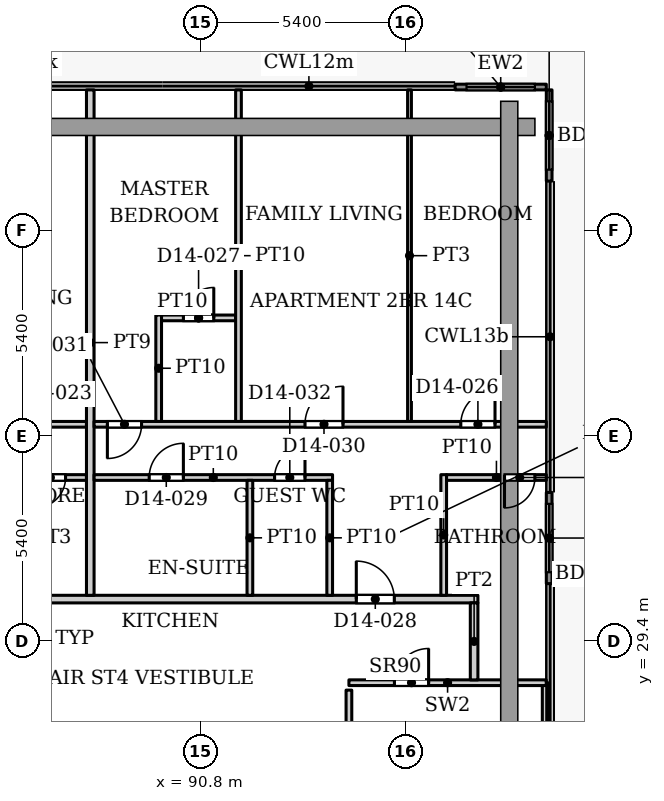
"""IFC4 building model, lengths in metres.
Left out: names, types, materials, properties, quantities, classifications, styles, units other than length and angle.
Written with IfcOpenShell. Run it as: python <this file> out.ifc"""

import sys

from ifc_helpers import new_model, si_unit, direction, frame, frame_2d, origin, place, context, subcontext, project, spatial, rectangle, extrude, source, transform, mapped, element, fill, save


model = new_model("IFC4")
c1 = context("Model", 3, precision=1e-05, world=origin(), true_north=direction((0.0, 1.0)))
c2 = subcontext(c1, "Body", "Model", "MODEL_VIEW")
j1 = project(units=[si_unit("LENGTHUNIT", "METRE"), si_unit("PLANEANGLEUNIT", "RADIAN")], contexts=[c1])
p1 = place(None, origin())
s1 = spatial("IfcSite", under=j1, at=p1, CompositionType="ELEMENT")
p2 = place(p1, origin())
s2 = spatial("IfcBuilding", under=s1, at=p2, CompositionType="ELEMENT")
p3 = place(p2, frame((0.0, 0.0, 61.7)))
s3 = spatial("IfcBuildingStorey", under=s2, at=p3, CompositionType="ELEMENT", Elevation=61.7)
p4 = place(p3, frame((97.5, 43.975, 0.0), z_axis=(0.0, 0.0, 1.0), x_axis=(1.0, 0.0, 0.0)))
e1 = element("IfcWall", 1, at=p4, inside=s3, PredefinedType="SOLIDWALL", context=c2, shape_type="SweptSolid", body=[
    extrude(rectangle(XDim=2.4, YDim=0.15, at=frame_2d((1.2, 0.0))), origin(), (0.0, 0.0, 1.0), 3.75),
])
p5 = place(p4, frame((0.3, 0.0, 0.0)))
e2 = element("IfcOpeningElement", 2, at=p5, cuts=e1, PredefinedType="OPENING", context=c2, shape_type="SweptSolid", body=[
    extrude(rectangle(XDim=1.8, YDim=2.4, at=frame_2d((0.9, 1.2))), frame((0.0, 0.085, 0.0), z_axis=(0.0, -1.0, 0.0), x_axis=(1.0, 0.0, 0.0)), (0.0, 0.0, 1.0), 0.17),
])
p6 = place(p3, frame((99.975, 43.9, 0.0), z_axis=(0.0, 0.0, 1.0), x_axis=(0.0, -1.0, 0.0)))
e3 = element("IfcWall", 3, at=p6, inside=s3, PredefinedType="SOLIDWALL", context=c2, shape_type="SweptSolid", body=[
    extrude(rectangle(XDim=2.4, YDim=0.15, at=frame_2d((1.2, 0.0))), origin(), (0.0, 0.0, 1.0), 3.75),
])
p7 = place(p6, frame((0.3, 0.0, 0.0)))
e4 = element("IfcOpeningElement", 4, at=p7, cuts=e3, PredefinedType="OPENING", context=c2, shape_type="SweptSolid", body=[
    extrude(rectangle(XDim=1.8, YDim=2.4, at=frame_2d((0.9, 1.2))), frame((0.0, 0.085, 0.0), z_axis=(0.0, -1.0, 0.0), x_axis=(1.0, 0.0, 0.0)), (0.0, 0.0, 1.0), 0.17),
])
p8 = place(p3, frame((99.975, 33.307, 0.0), z_axis=(0.0, 0.0, 1.0), x_axis=(0.0, -1.0, 0.0)))
e5 = element("IfcWall", 5, at=p8, inside=s3, PredefinedType="SOLIDWALL", context=c2, shape_type="SweptSolid", body=[
    extrude(rectangle(XDim=2.4, YDim=0.15, at=frame_2d((1.2, 0.0))), origin(), (0.0, 0.0, 1.0), 3.75),
])
p9 = place(p8, frame((0.3, 0.0, 0.0)))
e6 = element("IfcOpeningElement", 6, at=p9, cuts=e5, PredefinedType="OPENING", context=c2, shape_type="SweptSolid", body=[
    extrude(rectangle(XDim=1.8, YDim=2.4, at=frame_2d((0.9, 1.2))), frame((0.0, 0.085, 0.0), z_axis=(0.0, -1.0, 0.0), x_axis=(1.0, 0.0, 0.0)), (0.0, 0.0, 1.0), 0.17),
])
p10 = place(p3, frame((99.87, 21.015, 0.0), z_axis=(0.0, 0.0, 1.0), x_axis=(0.0, 1.0, 0.0)))
e7 = element("IfcWall", 7, at=p10, inside=s3, PredefinedType="PARTITIONING", context=c2, shape_type="SweptSolid", body=[
    extrude(rectangle(XDim=7.285, YDim=0.15, at=frame_2d((3.643, 0.0))), origin(), (0.0, 0.0, 1.0), 3.9),
])
p11 = place(p3, frame((94.706, 28.3, 0.0), z_axis=(0.0, 0.0, 1.0), x_axis=(1.0, 0.0, 0.0)))
e8 = element("IfcWall", 8, at=p11, inside=s3, PredefinedType="PARTITIONING", context=c2, shape_type="SweptSolid", body=[
    extrude(rectangle(XDim=5.192, YDim=0.15, at=frame_2d((2.596, 0.0))), origin(), (0.0, 0.0, 1.0), 3.9),
])
p12 = place(p11, frame((1.197, 0.0, 0.0)))
e9 = element("IfcOpeningElement", 9, at=p12, cuts=e8, PredefinedType="OPENING", context=c2, shape_type="SweptSolid", body=[
    extrude(rectangle(XDim=0.9, YDim=2.2, at=frame_2d((0.45, 1.1))), frame((0.0, 0.085, 0.0), z_axis=(0.0, -1.0, 0.0), x_axis=(1.0, 0.0, 0.0)), (0.0, 0.0, 1.0), 0.17),
])
p13 = place(p3, frame((94.706, 21.287, 0.0), z_axis=(0.0, 0.0, 1.0), x_axis=(0.0, 1.0, 0.0)))
e10 = element("IfcWall", 10, at=p13, inside=s3, PredefinedType="PARTITIONING", context=c2, shape_type="SweptSolid", body=[
    extrude(rectangle(XDim=6.818, YDim=0.15, at=frame_2d((3.409, 0.0))), origin(), (0.0, 0.0, 1.0), 3.9),
])
p14 = place(p3, frame((55.9, 30.5, 0.0), z_axis=(0.0, 0.0, 1.0), x_axis=(1.0, 0.0, 0.0)))
e11 = element("IfcWall", 11, at=p14, inside=s3, PredefinedType="PARTITIONING", context=c2, shape_type="SweptSolid", body=[
    extrude(rectangle(XDim=42.2, YDim=0.2, at=frame_2d((21.1, 0.0))), origin(), (0.0, 0.0, 1.0), 3.6),
])
p15 = place(p14, frame((14.7, 0.0, 0.0)))
e12 = element("IfcOpeningElement", 12, at=p15, cuts=e11, PredefinedType="OPENING", context=c2, shape_type="SweptSolid", body=[
    extrude(rectangle(XDim=1.0, YDim=2.1, at=frame_2d((0.5, 1.05))), frame((0.0, 0.11, 0.0), z_axis=(0.0, -1.0, 0.0), x_axis=(1.0, 0.0, 0.0)), (0.0, 0.0, 1.0), 0.22),
])
p16 = place(p14, frame((27.9, 0.0, 0.0)))
e13 = element("IfcOpeningElement", 13, at=p16, cuts=e11, PredefinedType="OPENING", context=c2, shape_type="SweptSolid", body=[
    extrude(rectangle(XDim=1.0, YDim=2.1, at=frame_2d((0.5, 1.05))), frame((0.0, 0.11, 0.0), z_axis=(0.0, -1.0, 0.0), x_axis=(1.0, 0.0, 0.0)), (0.0, 0.0, 1.0), 0.22),
])
p17 = place(p14, frame((39.0, 0.0, 0.0)))
e14 = element("IfcOpeningElement", 14, at=p17, cuts=e11, PredefinedType="OPENING", context=c2, shape_type="SweptSolid", body=[
    extrude(rectangle(XDim=1.0, YDim=2.1, at=frame_2d((0.5, 1.05))), frame((0.0, 0.11, 0.0), z_axis=(0.0, -1.0, 0.0), x_axis=(1.0, 0.0, 0.0)), (0.0, 0.0, 1.0), 0.22),
])
p18 = place(p3, frame((74.5, 35.1, 0.0), z_axis=(0.0, 0.0, 1.0), x_axis=(1.0, 0.0, 0.0)))
e15 = element("IfcWall", 15, at=p18, inside=s3, PredefinedType="PARTITIONING", context=c2, shape_type="SweptSolid", body=[
    extrude(rectangle(XDim=13.3, YDim=0.15, at=frame_2d((6.65, 0.0))), origin(), (0.0, 0.0, 1.0), 3.6),
])
p19 = place(p18, frame((1.1, 0.0, 0.0)))
e16 = element("IfcOpeningElement", 16, at=p19, cuts=e15, PredefinedType="OPENING", context=c2, shape_type="SweptSolid", body=[
    extrude(rectangle(XDim=0.9, YDim=2.1, at=frame_2d((0.45, 1.05))), frame((0.0, 0.085, 0.0), z_axis=(0.0, -1.0, 0.0), x_axis=(1.0, 0.0, 0.0)), (0.0, 0.0, 1.0), 0.17),
])
p20 = place(p18, frame((9.95, 0.0, 0.0)))
e17 = element("IfcOpeningElement", 17, at=p20, cuts=e15, PredefinedType="OPENING", context=c2, shape_type="SweptSolid", body=[
    extrude(rectangle(XDim=1.0, YDim=2.1, at=frame_2d((0.5, 1.05))), frame((0.0, 0.085, 0.0), z_axis=(0.0, -1.0, 0.0), x_axis=(1.0, 0.0, 0.0)), (0.0, 0.0, 1.0), 0.17),
])
p21 = place(p18, frame((4.25, 0.0, 0.0)))
e18 = element("IfcOpeningElement", 18, at=p21, cuts=e15, PredefinedType="OPENING", context=c2, shape_type="SweptSolid", body=[
    extrude(rectangle(XDim=0.9, YDim=2.1, at=frame_2d((0.45, 1.05))), frame((0.0, 0.085, 0.0), z_axis=(0.0, -1.0, 0.0), x_axis=(1.0, 0.0, 0.0)), (0.0, 0.0, 1.0), 0.17),
])
p22 = place(p3, frame((85.75, 33.7, 0.0), z_axis=(0.0, 0.0, 1.0), x_axis=(1.0, 0.0, 0.0)))
e19 = element("IfcWall", 19, at=p22, inside=s3, PredefinedType="PARTITIONING", context=c2, shape_type="SweptSolid", body=[
    extrude(rectangle(XDim=2.05, YDim=0.15, at=frame_2d((1.025, 0.0))), origin(), (0.0, 0.0, 1.0), 3.6),
])
p23 = place(p22, frame((0.7, 0.0, 0.0)))
e20 = element("IfcOpeningElement", 20, at=p23, cuts=e19, PredefinedType="OPENING", context=c2, shape_type="SweptSolid", body=[
    extrude(rectangle(XDim=0.8, YDim=2.1, at=frame_2d((0.4, 1.05))), frame((0.0, 0.085, 0.0), z_axis=(0.0, -1.0, 0.0), x_axis=(1.0, 0.0, 0.0)), (0.0, 0.0, 1.0), 0.17),
])
p24 = place(p3, frame((87.9, 30.6, 0.0), z_axis=(0.0, 0.0, 1.0), x_axis=(0.0, 1.0, 0.0)))
e21 = element("IfcWall", 21, at=p24, inside=s3, PredefinedType="PARTITIONING", context=c2, shape_type="SweptSolid", body=[
    extrude(rectangle(XDim=13.3, YDim=0.2, at=frame_2d((6.65, 0.0))), origin(), (0.0, 0.0, 1.0), 3.6),
])
p25 = place(p3, frame((88.0, 33.7, 0.0), z_axis=(0.0, 0.0, 1.0), x_axis=(1.0, 0.0, 0.0)))
e22 = element("IfcWall", 22, at=p25, inside=s3, PredefinedType="PARTITIONING", context=c2, shape_type="SweptSolid", body=[
    extrude(rectangle(XDim=6.275, YDim=0.15, at=frame_2d((3.137, 0.0))), origin(), (0.0, 0.0, 1.0), 3.6),
])
p26 = place(p25, frame((1.45, 0.0, 0.0)))
e23 = element("IfcOpeningElement", 23, at=p26, cuts=e22, PredefinedType="OPENING", context=c2, shape_type="SweptSolid", body=[
    extrude(rectangle(XDim=0.9, YDim=2.1, at=frame_2d((0.45, 1.05))), frame((0.0, 0.085, 0.0), z_axis=(0.0, -1.0, 0.0), x_axis=(1.0, 0.0, 0.0)), (0.0, 0.0, 1.0), 0.17),
])
p27 = place(p25, frame((4.75, 0.0, 0.0)))
e24 = element("IfcOpeningElement", 24, at=p27, cuts=e22, PredefinedType="OPENING", context=c2, shape_type="SweptSolid", body=[
    extrude(rectangle(XDim=0.8, YDim=2.1, at=frame_2d((0.4, 1.05))), frame((0.0, 0.085, 0.0), z_axis=(0.0, -1.0, 0.0), x_axis=(1.0, 0.0, 0.0)), (0.0, 0.0, 1.0), 0.17),
])
p28 = place(p3, frame((88.0, 35.1, 0.0), z_axis=(0.0, 0.0, 1.0), x_axis=(1.0, 0.0, 0.0)))
e25 = element("IfcWall", 25, at=p28, inside=s3, PredefinedType="PARTITIONING", context=c2, shape_type="SweptSolid", body=[
    extrude(rectangle(XDim=11.9, YDim=0.15, at=frame_2d((5.95, 0.0))), origin(), (0.0, 0.0, 1.0), 3.6),
])
p29 = place(p28, frame((9.65, 0.0, 0.0)))
e26 = element("IfcOpeningElement", 26, at=p29, cuts=e25, PredefinedType="OPENING", context=c2, shape_type="SweptSolid", body=[
    extrude(rectangle(XDim=0.9, YDim=2.1, at=frame_2d((0.45, 1.05))), frame((0.0, 0.085, 0.0), z_axis=(0.0, -1.0, 0.0), x_axis=(1.0, 0.0, 0.0)), (0.0, 0.0, 1.0), 0.17),
])
p30 = place(p28, frame((5.55, 0.0, 0.0)))
e27 = element("IfcOpeningElement", 27, at=p30, cuts=e25, PredefinedType="OPENING", context=c2, shape_type="SweptSolid", body=[
    extrude(rectangle(XDim=1.0, YDim=2.1, at=frame_2d((0.5, 1.05))), frame((0.0, 0.085, 0.0), z_axis=(0.0, -1.0, 0.0), x_axis=(1.0, 0.0, 0.0)), (0.0, 0.0, 1.0), 0.17),
])
p31 = place(p28, frame((0.35, 0.0, 0.0)))
e28 = element("IfcOpeningElement", 28, at=p31, cuts=e25, PredefinedType="OPENING", context=c2, shape_type="SweptSolid", body=[
    extrude(rectangle(XDim=0.9, YDim=2.1, at=frame_2d((0.45, 1.05))), frame((0.0, 0.085, 0.0), z_axis=(0.0, -1.0, 0.0), x_axis=(1.0, 0.0, 0.0)), (0.0, 0.0, 1.0), 0.17),
])
p32 = place(p3, frame((89.7, 35.175, 0.0), z_axis=(0.0, 0.0, 1.0), x_axis=(0.0, 1.0, 0.0)))
e29 = element("IfcWall", 29, at=p32, inside=s3, PredefinedType="PARTITIONING", context=c2, shape_type="SweptSolid", body=[
    extrude(rectangle(XDim=2.8, YDim=0.15, at=frame_2d((1.4, 0.0))), origin(), (0.0, 0.0, 1.0), 3.6),
])
p33 = place(p3, frame((89.775, 37.9, 0.0), z_axis=(0.0, 0.0, 1.0), x_axis=(1.0, 0.0, 0.0)))
e30 = element("IfcWall", 30, at=p33, inside=s3, PredefinedType="PARTITIONING", context=c2, shape_type="SweptSolid", body=[
    extrude(rectangle(XDim=1.95, YDim=0.15, at=frame_2d((0.975, 0.0))), origin(), (0.0, 0.0, 1.0), 3.6),
])
p34 = place(p33, frame((0.575, 0.0, 0.0)))
e31 = element("IfcOpeningElement", 31, at=p34, cuts=e30, PredefinedType="OPENING", context=c2, shape_type="SweptSolid", body=[
    extrude(rectangle(XDim=0.8, YDim=2.1, at=frame_2d((0.4, 1.05))), frame((0.0, 0.085, 0.0), z_axis=(0.0, -1.0, 0.0), x_axis=(1.0, 0.0, 0.0)), (0.0, 0.0, 1.0), 0.17),
])
p35 = place(p3, frame((91.8, 35.175, 0.0), z_axis=(0.0, 0.0, 1.0), x_axis=(0.0, 1.0, 0.0)))
e32 = element("IfcWall", 32, at=p35, inside=s3, PredefinedType="PARTITIONING", context=c2, shape_type="SweptSolid", body=[
    extrude(rectangle(XDim=8.725, YDim=0.15, at=frame_2d((4.362, 0.0))), origin(), (0.0, 0.0, 1.0), 3.6),
])
for number, where, z_axis, x_axis in (
    (33, (92.1, 30.6, 0.0), (0.0, 0.0, 1.0), (0.0, 1.0, 0.0)),
    (34, (94.2, 30.6, 0.0), (0.0, 0.0, 1.0), (0.0, 1.0, 0.0)),
):
    element("IfcWall", number, at=place(p3, frame(where, z_axis=z_axis, x_axis=x_axis)), inside=s3, PredefinedType="PARTITIONING", context=c2, shape_type="SweptSolid", body=[
        extrude(rectangle(XDim=3.025, YDim=0.15, at=frame_2d((1.512, 0.0))), origin(), (0.0, 0.0, 1.0), 3.6),
    ])
p36 = place(p3, frame((96.3, 35.175, 0.0), z_axis=(0.0, 0.0, 1.0), x_axis=(0.0, 1.0, 0.0)))
e35 = element("IfcWall", 35, at=p36, inside=s3, PredefinedType="PARTITIONING", context=c2, shape_type="SweptSolid", body=[
    extrude(rectangle(XDim=8.725, YDim=0.1, at=frame_2d((4.362, 0.0))), origin(), (0.0, 0.0, 1.0), 3.6),
])
p37 = place(p3, frame((97.2, 30.6, 0.0), z_axis=(0.0, 0.0, 1.0), x_axis=(0.0, 1.0, 0.0)))
e36 = element("IfcWall", 36, at=p37, inside=s3, PredefinedType="PARTITIONING", context=c2, shape_type="SweptSolid", body=[
    extrude(rectangle(XDim=3.175, YDim=0.15, at=frame_2d((1.587, 0.0))), origin(), (0.0, 0.0, 1.0), 3.6),
])
p38 = place(p3, frame((97.275, 33.7, 0.0), z_axis=(0.0, 0.0, 1.0), x_axis=(1.0, 0.0, 0.0)))
e37 = element("IfcWall", 37, at=p38, inside=s3, PredefinedType="PARTITIONING", context=c2, shape_type="SweptSolid", body=[
    extrude(rectangle(XDim=2.625, YDim=0.15, at=frame_2d((1.312, 0.0))), origin(), (0.0, 0.0, 1.0), 3.6),
])
p39 = place(p38, frame((1.525, 0.0, 0.0)))
e38 = element("IfcOpeningElement", 38, at=p39, cuts=e37, PredefinedType="OPENING", context=c2, shape_type="SweptSolid", body=[
    extrude(rectangle(XDim=0.8, YDim=2.1, at=frame_2d((0.4, 1.05))), frame((0.0, 0.085, 0.0), z_axis=(0.0, -1.0, 0.0), x_axis=(1.0, 0.0, 0.0)), (0.0, 0.0, 1.0), 0.17),
])
p40 = place(p3, frame((98.0, 28.374, 0.0), z_axis=(0.0, 0.0, 1.0), x_axis=(0.0, 1.0, 0.0)))
e39 = element("IfcWall", 39, at=p40, inside=s3, PredefinedType="PARTITIONING", context=c2, shape_type="SweptSolid", body=[
    extrude(rectangle(XDim=2.026, YDim=0.2, at=frame_2d((1.013, 0.0))), origin(), (0.0, 0.0, 1.0), 3.6),
])
m1 = source(origin(), c2, "Body", "SweptSolid", [
    extrude(rectangle(XDim=1.8, YDim=2.4, at=frame_2d((0.9, 1.2))), frame((0.0, 0.025, 0.0), z_axis=(0.0, -1.0, 0.0), x_axis=(1.0, 0.0, 0.0)), (0.0, 0.0, 1.0), 0.05),
])
p41 = place(p5, origin())
e40 = element("IfcDoor", 40, at=p41, inside=s3, OperationType="SLIDING_TO_LEFT", PredefinedType="DOOR", context=c2, shape_type="MappedRepresentation", body=[
    mapped(m1, transform((0.0, 0.0, 0.0), x_axis=(1.0, 0.0, 0.0), y_axis=(0.0, 1.0, 0.0), z_axis=(0.0, 0.0, 1.0), scale=1.0)),
])
fill(e2, e40)
p42 = place(p7, origin())
e41 = element("IfcDoor", 41, at=p42, inside=s3, OperationType="SLIDING_TO_LEFT", PredefinedType="DOOR", context=c2, shape_type="MappedRepresentation", body=[
    mapped(m1, transform((0.0, 0.0, 0.0), x_axis=(1.0, 0.0, 0.0), y_axis=(0.0, 1.0, 0.0), z_axis=(0.0, 0.0, 1.0), scale=1.0)),
])
fill(e4, e41)
p43 = place(p9, origin())
e42 = element("IfcDoor", 42, at=p43, inside=s3, OperationType="SLIDING_TO_LEFT", PredefinedType="DOOR", context=c2, shape_type="MappedRepresentation", body=[
    mapped(m1, transform((0.0, 0.0, 0.0), x_axis=(1.0, 0.0, 0.0), y_axis=(0.0, 1.0, 0.0), z_axis=(0.0, 0.0, 1.0), scale=1.0)),
])
fill(e6, e42)
m2 = source(origin(), c2, "Body", "SweptSolid", [
    extrude(rectangle(XDim=0.9, YDim=2.2, at=frame_2d((0.45, 1.1))), frame((0.0, 0.025, 0.0), z_axis=(0.0, -1.0, 0.0), x_axis=(1.0, 0.0, 0.0)), (0.0, 0.0, 1.0), 0.05),
])
p44 = place(p12, origin())
e43 = element("IfcDoor", 43, at=p44, inside=s3, OperationType="SINGLE_SWING_LEFT", PredefinedType="DOOR", context=c2, shape_type="MappedRepresentation", body=[
    mapped(m2, transform((0.0, 0.0, 0.0), x_axis=(1.0, 0.0, 0.0), y_axis=(0.0, 1.0, 0.0), z_axis=(0.0, 0.0, 1.0), scale=1.0)),
])
fill(e9, e43)
m3 = source(origin(), c2, "Body", "SweptSolid", [
    extrude(rectangle(XDim=0.8, YDim=2.1, at=frame_2d((0.4, 1.05))), frame((0.0, 0.025, 0.0), z_axis=(0.0, -1.0, 0.0), x_axis=(1.0, 0.0, 0.0)), (0.0, 0.0, 1.0), 0.05),
])
p45 = place(p23, origin())
e44 = element("IfcDoor", 44, at=p45, inside=s3, OperationType="SINGLE_SWING_RIGHT", PredefinedType="DOOR", context=c2, shape_type="MappedRepresentation", body=[
    mapped(m3, transform((0.0, 0.0, 0.0), x_axis=(1.0, 0.0, 0.0), y_axis=(0.0, 1.0, 0.0), z_axis=(0.0, 0.0, 1.0), scale=1.0)),
])
fill(e20, e44)
p46 = place(p39, origin())
e45 = element("IfcDoor", 45, at=p46, inside=s3, OperationType="SINGLE_SWING_RIGHT", PredefinedType="DOOR", context=c2, shape_type="MappedRepresentation", body=[
    mapped(m3, transform((0.0, 0.0, 0.0), x_axis=(1.0, 0.0, 0.0), y_axis=(0.0, 1.0, 0.0), z_axis=(0.0, 0.0, 1.0), scale=1.0)),
])
fill(e38, e45)
m4 = source(origin(), c2, "Body", "SweptSolid", [
    extrude(rectangle(XDim=0.9, YDim=2.1, at=frame_2d((0.45, 1.05))), frame((0.0, 0.025, 0.0), z_axis=(0.0, -1.0, 0.0), x_axis=(1.0, 0.0, 0.0)), (0.0, 0.0, 1.0), 0.05),
])
p47 = place(p29, origin())
e46 = element("IfcDoor", 46, at=p47, inside=s3, OperationType="SINGLE_SWING_LEFT", PredefinedType="DOOR", context=c2, shape_type="MappedRepresentation", body=[
    mapped(m4, transform((0.0, 0.0, 0.0), x_axis=(1.0, 0.0, 0.0), y_axis=(0.0, 1.0, 0.0), z_axis=(0.0, 0.0, 1.0), scale=1.0)),
])
fill(e26, e46)
p48 = place(p34, origin())
e47 = element("IfcDoor", 47, at=p48, inside=s3, OperationType="SINGLE_SWING_LEFT", PredefinedType="DOOR", context=c2, shape_type="MappedRepresentation", body=[
    mapped(m3, transform((0.0, 0.0, 0.0), x_axis=(1.0, 0.0, 0.0), y_axis=(0.0, 1.0, 0.0), z_axis=(0.0, 0.0, 1.0), scale=1.0)),
])
fill(e31, e47)
m5 = source(origin(), c2, "Body", "SweptSolid", [
    extrude(rectangle(XDim=1.0, YDim=2.1, at=frame_2d((0.5, 1.05))), frame((0.0, 0.025, 0.0), z_axis=(0.0, -1.0, 0.0), x_axis=(1.0, 0.0, 0.0)), (0.0, 0.0, 1.0), 0.05),
])
p49 = place(p17, origin())
e48 = element("IfcDoor", 48, at=p49, inside=s3, OperationType="SINGLE_SWING_LEFT", PredefinedType="DOOR", context=c2, shape_type="MappedRepresentation", body=[
    mapped(m5, transform((0.0, 0.0, 0.0), x_axis=(1.0, 0.0, 0.0), y_axis=(0.0, 1.0, 0.0), z_axis=(0.0, 0.0, 1.0), scale=1.0)),
])
fill(e14, e48)
p50 = place(p26, origin())
e49 = element("IfcDoor", 49, at=p50, inside=s3, OperationType="SINGLE_SWING_LEFT", PredefinedType="DOOR", context=c2, shape_type="MappedRepresentation", body=[
    mapped(m4, transform((0.0, 0.0, 0.0), x_axis=(1.0, 0.0, 0.0), y_axis=(0.0, 1.0, 0.0), z_axis=(0.0, 0.0, 1.0), scale=1.0)),
])
fill(e23, e49)
m6 = source(origin(), c2, "Body", "SweptSolid", [
    extrude(rectangle(XDim=1.0, YDim=2.1, at=frame_2d((0.5, 1.05))), frame((0.0, 0.025, 0.0), z_axis=(0.0, -1.0, 0.0), x_axis=(1.0, 0.0, 0.0)), (0.0, 0.0, 1.0), 0.05),
])
p51 = place(p30, origin())
e50 = element("IfcDoor", 50, at=p51, inside=s3, OperationType="SINGLE_SWING_LEFT", PredefinedType="DOOR", context=c2, shape_type="MappedRepresentation", body=[
    mapped(m6, transform((0.0, 0.0, 0.0), x_axis=(1.0, 0.0, 0.0), y_axis=(0.0, 1.0, 0.0), z_axis=(0.0, 0.0, 1.0), scale=1.0)),
])
fill(e27, e50)
p52 = place(p31, origin())
e51 = element("IfcDoor", 51, at=p52, inside=s3, OperationType="SINGLE_SWING_RIGHT", PredefinedType="DOOR", context=c2, shape_type="MappedRepresentation", body=[
    mapped(m4, transform((0.0, 0.0, 0.0), x_axis=(1.0, 0.0, 0.0), y_axis=(0.0, 1.0, 0.0), z_axis=(0.0, 0.0, 1.0), scale=1.0)),
])
fill(e28, e51)
p53 = place(p27, origin())
e52 = element("IfcDoor", 52, at=p53, inside=s3, OperationType="SINGLE_SWING_LEFT", PredefinedType="DOOR", context=c2, shape_type="MappedRepresentation", body=[
    mapped(m3, transform((0.0, 0.0, 0.0), x_axis=(1.0, 0.0, 0.0), y_axis=(0.0, 1.0, 0.0), z_axis=(0.0, 0.0, 1.0), scale=1.0)),
])
fill(e24, e52)
save(model, sys.argv[1])
